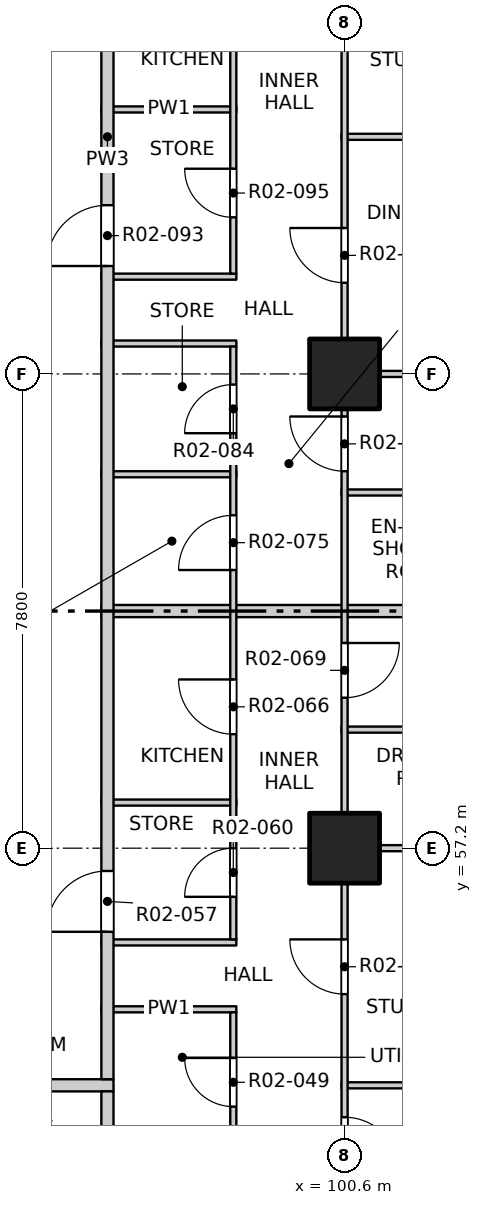
"""IFC4 building model, lengths in metres.
Left out: names, types, materials, properties, quantities, classifications, styles, units other than length and angle.
Written with IfcOpenShell. Run it as: python <this file> out.ifc"""

import sys

from ifc_helpers import new_model, si_unit, direction, frame, frame_2d, origin, origin_2d, place, context, subcontext, project, spatial, rectangle, extrude, element, fill, save


model = new_model("IFC4")
c1 = context("Model", 3, precision=1e-05, world=origin(), true_north=direction((0.0, 1.0)))
c2 = subcontext(c1, "Body", "Model", "MODEL_VIEW")
j1 = project(units=[si_unit("LENGTHUNIT", "METRE"), si_unit("PLANEANGLEUNIT", "RADIAN")], contexts=[c1])
p1 = place(None, origin())
s1 = spatial("IfcSite", under=j1, at=p1, CompositionType="ELEMENT")
p2 = place(p1, origin())
s2 = spatial("IfcBuilding", under=s1, at=p2, CompositionType="ELEMENT")
p3 = place(p2, frame((0.0, 0.0, 29.7)))
s3 = spatial("IfcBuildingStorey", under=s2, at=p3, CompositionType="ELEMENT", Elevation=29.7)
for number, where, z_axis, x_axis in (
    (1, (100.6, 57.2, -0.25), (0.0, 0.0, 1.0), (1.0, 0.0, 0.0)),
    (2, (100.6, 65.0, -0.25), (0.0, 0.0, 1.0), (1.0, 0.0, 0.0)),
):
    element("IfcColumn", number, at=place(p3, frame(where, z_axis=z_axis, x_axis=x_axis)), inside=s3, PredefinedType="COLUMN", context=c2, shape_type="SweptSolid", body=[
        extrude(rectangle(XDim=1.15, YDim=1.15, at=origin_2d()), origin(), (0.0, 0.0, 1.0), 3.4),
    ])
p4 = place(p3, frame((73.2, 53.3, 0.0), z_axis=(0.0, 0.0, 1.0), x_axis=(1.0, 0.0, 0.0)))
e3 = element("IfcWall", 3, at=p4, inside=s3, PredefinedType="PARTITIONING", context=c2, shape_type="SweptSolid", body=[
    extrude(rectangle(XDim=23.6, YDim=0.2, at=frame_2d((11.8, 0.0))), origin(), (0.0, 0.0, 1.0), 3.15),
])
p5 = place(p4, frame((5.925, 0.0, 0.0)))
e4 = element("IfcOpeningElement", 4, at=p5, cuts=e3, PredefinedType="OPENING", context=c2, shape_type="SweptSolid", body=[
    extrude(rectangle(XDim=1.0, YDim=2.1, at=frame_2d((0.5, 1.05))), frame((0.0, 0.11, 0.0), z_axis=(0.0, -1.0, 0.0), x_axis=(1.0, 0.0, 0.0)), (0.0, 0.0, 1.0), 0.22),
])
p6 = place(p4, frame((17.925, 0.0, 0.0)))
e5 = element("IfcOpeningElement", 5, at=p6, cuts=e3, PredefinedType="OPENING", context=c2, shape_type="SweptSolid", body=[
    extrude(rectangle(XDim=1.0, YDim=2.1, at=frame_2d((0.5, 1.05))), frame((0.0, 0.11, 0.0), z_axis=(0.0, -1.0, 0.0), x_axis=(1.0, 0.0, 0.0)), (0.0, 0.0, 1.0), 0.22),
])
p7 = place(p3, frame((100.55, 53.3, 0.0), z_axis=(0.0, 0.0, 1.0), x_axis=(1.0, 0.0, 0.0)))
e6 = element("IfcWall", 6, at=p7, inside=s3, PredefinedType="PARTITIONING", context=c2, shape_type="SweptSolid", body=[
    extrude(rectangle(XDim=7.55, YDim=0.1, at=frame_2d((3.775, 0.0))), origin(), (0.0, 0.0, 1.0), 3.15),
])
for number, where, z_axis, x_axis in (
    (7, (96.6, 54.55, 0.0), (0.0, 0.0, 1.0), (1.0, 0.0, 0.0)),
    (8, (96.6, 55.65, 0.0), (0.0, 0.0, 1.0), (1.0, 0.0, 0.0)),
):
    element("IfcWall", number, at=place(p3, frame(where, z_axis=z_axis, x_axis=x_axis)), inside=s3, PredefinedType="PARTITIONING", context=c2, shape_type="SweptSolid", body=[
        extrude(rectangle(XDim=2.22, YDim=0.1, at=frame_2d((1.11, 0.0))), origin(), (0.0, 0.0, 1.0), 3.15),
    ])
p8 = place(p3, frame((100.55, 57.2, 0.0), z_axis=(0.0, 0.0, 1.0), x_axis=(1.0, 0.0, 0.0)))
e9 = element("IfcWall", 9, at=p8, inside=s3, PredefinedType="PARTITIONING", context=c2, shape_type="SweptSolid", body=[
    extrude(rectangle(XDim=7.55, YDim=0.1, at=frame_2d((3.775, 0.0))), origin(), (0.0, 0.0, 1.0), 2.55),
])
p9 = place(p3, frame((96.6, 57.95, 0.0), z_axis=(0.0, 0.0, 1.0), x_axis=(1.0, 0.0, 0.0)))
e10 = element("IfcWall", 10, at=p9, inside=s3, PredefinedType="PARTITIONING", context=c2, shape_type="SweptSolid", body=[
    extrude(rectangle(XDim=2.22, YDim=0.1, at=frame_2d((1.11, 0.0))), origin(), (0.0, 0.0, 1.0), 3.15),
])
p10 = place(p3, frame((100.55, 59.15, 0.0), z_axis=(0.0, 0.0, 1.0), x_axis=(1.0, 0.0, 0.0)))
e11 = element("IfcWall", 11, at=p10, inside=s3, PredefinedType="PARTITIONING", context=c2, shape_type="SweptSolid", body=[
    extrude(rectangle(XDim=3.55, YDim=0.1, at=frame_2d((1.775, 0.0))), origin(), (0.0, 0.0, 1.0), 3.15),
])
p11 = place(p3, frame((96.6, 61.1, 0.0), z_axis=(0.0, 0.0, 1.0), x_axis=(1.0, 0.0, 0.0)))
e12 = element("IfcWall", 12, at=p11, inside=s3, PredefinedType="PARTITIONING", context=c2, shape_type="SweptSolid", body=[
    extrude(rectangle(XDim=11.5, YDim=0.2, at=frame_2d((5.75, 0.0))), origin(), (0.0, 0.0, 1.0), 3.15),
])
p12 = place(p3, frame((100.55, 63.05, 0.0), z_axis=(0.0, 0.0, 1.0), x_axis=(1.0, 0.0, 0.0)))
e13 = element("IfcWall", 13, at=p12, inside=s3, PredefinedType="PARTITIONING", context=c2, shape_type="SweptSolid", body=[
    extrude(rectangle(XDim=3.7, YDim=0.1, at=frame_2d((1.85, 0.0))), origin(), (0.0, 0.0, 1.0), 3.15),
])
p13 = place(p3, frame((96.6, 63.35, 0.0), z_axis=(0.0, 0.0, 1.0), x_axis=(1.0, 0.0, 0.0)))
e14 = element("IfcWall", 14, at=p13, inside=s3, PredefinedType="PARTITIONING", context=c2, shape_type="SweptSolid", body=[
    extrude(rectangle(XDim=2.22, YDim=0.1, at=frame_2d((1.11, 0.0))), origin(), (0.0, 0.0, 1.0), 3.15),
])
p14 = place(p3, frame((100.55, 65.0, 0.0), z_axis=(0.0, 0.0, 1.0), x_axis=(1.0, 0.0, 0.0)))
e15 = element("IfcWall", 15, at=p14, inside=s3, PredefinedType="PARTITIONING", context=c2, shape_type="SweptSolid", body=[
    extrude(rectangle(XDim=7.55, YDim=0.1, at=frame_2d((3.775, 0.0))), origin(), (0.0, 0.0, 1.0), 2.55),
])
for number, where, z_axis, x_axis in (
    (16, (96.6, 65.5, 0.0), (0.0, 0.0, 1.0), (1.0, 0.0, 0.0)),
    (17, (96.6, 66.6, 0.0), (0.0, 0.0, 1.0), (1.0, 0.0, 0.0)),
):
    element("IfcWall", number, at=place(p3, frame(where, z_axis=z_axis, x_axis=x_axis)), inside=s3, PredefinedType="PARTITIONING", context=c2, shape_type="SweptSolid", body=[
        extrude(rectangle(XDim=2.22, YDim=0.1, at=frame_2d((1.11, 0.0))), origin(), (0.0, 0.0, 1.0), 3.15),
    ])
p15 = place(p3, frame((100.55, 68.9, 0.0), z_axis=(0.0, 0.0, 1.0), x_axis=(1.0, 0.0, 0.0)))
e18 = element("IfcWall", 18, at=p15, inside=s3, PredefinedType="PARTITIONING", context=c2, shape_type="SweptSolid", body=[
    extrude(rectangle(XDim=7.55, YDim=0.1, at=frame_2d((3.775, 0.0))), origin(), (0.0, 0.0, 1.0), 3.15),
])
p16 = place(p3, frame((96.6, 69.35, 0.0), z_axis=(0.0, 0.0, 1.0), x_axis=(1.0, 0.0, 0.0)))
e19 = element("IfcWall", 19, at=p16, inside=s3, PredefinedType="PARTITIONING", context=c2, shape_type="SweptSolid", body=[
    extrude(rectangle(XDim=2.22, YDim=0.1, at=frame_2d((1.11, 0.0))), origin(), (0.0, 0.0, 1.0), 3.15),
])
p17 = place(p3, frame((96.7, 41.9, 0.0), z_axis=(0.0, 0.0, 1.0), x_axis=(0.0, 1.0, 0.0)))
e20 = element("IfcWall", 20, at=p17, inside=s3, PredefinedType="PARTITIONING", context=c2, shape_type="SweptSolid", body=[
    extrude(rectangle(XDim=11.3, YDim=0.2, at=frame_2d((5.65, 0.0))), origin(), (0.0, 0.0, 1.0), 3.15),
])
p18 = place(p3, frame((96.7, 53.4, 0.0), z_axis=(0.0, 0.0, 1.0), x_axis=(0.0, 1.0, 0.0)))
e21 = element("IfcWall", 21, at=p18, inside=s3, PredefinedType="PARTITIONING", context=c2, shape_type="SweptSolid", body=[
    extrude(rectangle(XDim=31.0, YDim=0.2, at=frame_2d((15.5, 0.0))), origin(), (0.0, 0.0, 1.0), 3.15),
])
p19 = place(p18, frame((2.425, 0.0, 0.0)))
e22 = element("IfcOpeningElement", 22, at=p19, cuts=e21, PredefinedType="OPENING", context=c2, shape_type="SweptSolid", body=[
    extrude(rectangle(XDim=1.0, YDim=2.1, at=frame_2d((0.5, 1.05))), frame((0.0, 0.11, 0.0), z_axis=(0.0, -1.0, 0.0), x_axis=(1.0, 0.0, 0.0)), (0.0, 0.0, 1.0), 0.22),
])
p20 = place(p18, frame((13.375, 0.0, 0.0)))
e23 = element("IfcOpeningElement", 23, at=p20, cuts=e21, PredefinedType="OPENING", context=c2, shape_type="SweptSolid", body=[
    extrude(rectangle(XDim=1.0, YDim=2.1, at=frame_2d((0.5, 1.05))), frame((0.0, 0.11, 0.0), z_axis=(0.0, -1.0, 0.0), x_axis=(1.0, 0.0, 0.0)), (0.0, 0.0, 1.0), 0.22),
])
p21 = place(p18, frame((29.525, 0.0, 0.0)))
e24 = element("IfcOpeningElement", 24, at=p21, cuts=e21, PredefinedType="OPENING", context=c2, shape_type="SweptSolid", body=[
    extrude(rectangle(XDim=1.0, YDim=2.1, at=frame_2d((0.5, 1.05))), frame((0.0, 0.11, 0.0), z_axis=(0.0, -1.0, 0.0), x_axis=(1.0, 0.0, 0.0)), (0.0, 0.0, 1.0), 0.22),
])
p22 = place(p3, frame((98.77, 45.55, 0.0), z_axis=(0.0, 0.0, 1.0), x_axis=(0.0, 1.0, 0.0)))
e25 = element("IfcWall", 25, at=p22, inside=s3, PredefinedType="PARTITIONING", context=c2, shape_type="SweptSolid", body=[
    extrude(rectangle(XDim=8.95, YDim=0.1, at=frame_2d((4.475, 0.0))), origin(), (0.0, 0.0, 1.0), 3.15),
])
p23 = place(p22, frame((0.4, 0.0, 0.0)))
e26 = element("IfcOpeningElement", 26, at=p23, cuts=e25, PredefinedType="OPENING", context=c2, shape_type="SweptSolid", body=[
    extrude(rectangle(XDim=0.9, YDim=2.1, at=frame_2d((0.45, 1.05))), frame((0.0, 0.06, 0.0), z_axis=(0.0, -1.0, 0.0), x_axis=(1.0, 0.0, 0.0)), (0.0, 0.0, 1.0), 0.12),
])
p24 = place(p22, frame((2.5, 0.0, 0.0)))
e27 = element("IfcOpeningElement", 27, at=p24, cuts=e25, PredefinedType="OPENING", context=c2, shape_type="SweptSolid", body=[
    extrude(rectangle(XDim=0.9, YDim=2.1, at=frame_2d((0.45, 1.05))), frame((0.0, 0.06, 0.0), z_axis=(0.0, -1.0, 0.0), x_axis=(1.0, 0.0, 0.0)), (0.0, 0.0, 1.0), 0.12),
])
p25 = place(p22, frame((4.975, 0.0, 0.0)))
e28 = element("IfcOpeningElement", 28, at=p25, cuts=e25, PredefinedType="OPENING", context=c2, shape_type="SweptSolid", body=[
    extrude(rectangle(XDim=0.8, YDim=2.1, at=frame_2d((0.4, 1.05))), frame((0.0, 0.06, 0.0), z_axis=(0.0, -1.0, 0.0), x_axis=(1.0, 0.0, 0.0)), (0.0, 0.0, 1.0), 0.12),
])
p26 = place(p22, frame((7.4, 0.0, 0.0)))
e29 = element("IfcOpeningElement", 29, at=p26, cuts=e25, PredefinedType="OPENING", context=c2, shape_type="SweptSolid", body=[
    extrude(rectangle(XDim=0.8, YDim=2.1, at=frame_2d((0.4, 1.05))), frame((0.0, 0.06, 0.0), z_axis=(0.0, -1.0, 0.0), x_axis=(1.0, 0.0, 0.0)), (0.0, 0.0, 1.0), 0.12),
])
p27 = place(p3, frame((98.77, 55.7, 0.0), z_axis=(0.0, 0.0, 1.0), x_axis=(0.0, 1.0, 0.0)))
e30 = element("IfcWall", 30, at=p27, inside=s3, PredefinedType="PARTITIONING", context=c2, shape_type="SweptSolid", body=[
    extrude(rectangle(XDim=9.75, YDim=0.1, at=frame_2d((4.875, 0.0))), origin(), (0.0, 0.0, 1.0), 3.15),
])
p28 = place(p27, frame((0.7, 0.0, 0.0)))
e31 = element("IfcOpeningElement", 31, at=p28, cuts=e30, PredefinedType="OPENING", context=c2, shape_type="SweptSolid", body=[
    extrude(rectangle(XDim=0.8, YDim=2.1, at=frame_2d((0.4, 1.05))), frame((0.0, 0.06, 0.0), z_axis=(0.0, -1.0, 0.0), x_axis=(1.0, 0.0, 0.0)), (0.0, 0.0, 1.0), 0.12),
])
p29 = place(p27, frame((3.375, 0.0, 0.0)))
e32 = element("IfcOpeningElement", 32, at=p29, cuts=e30, PredefinedType="OPENING", context=c2, shape_type="SweptSolid", body=[
    extrude(rectangle(XDim=0.9, YDim=2.1, at=frame_2d((0.45, 1.05))), frame((0.0, 0.06, 0.0), z_axis=(0.0, -1.0, 0.0), x_axis=(1.0, 0.0, 0.0)), (0.0, 0.0, 1.0), 0.12),
])
p30 = place(p27, frame((6.075, 0.0, 0.0)))
e33 = element("IfcOpeningElement", 33, at=p30, cuts=e30, PredefinedType="OPENING", context=c2, shape_type="SweptSolid", body=[
    extrude(rectangle(XDim=0.9, YDim=2.1, at=frame_2d((0.45, 1.05))), frame((0.0, 0.06, 0.0), z_axis=(0.0, -1.0, 0.0), x_axis=(1.0, 0.0, 0.0)), (0.0, 0.0, 1.0), 0.12),
])
p31 = place(p27, frame((8.325, 0.0, 0.0)))
e34 = element("IfcOpeningElement", 34, at=p31, cuts=e30, PredefinedType="OPENING", context=c2, shape_type="SweptSolid", body=[
    extrude(rectangle(XDim=0.8, YDim=2.1, at=frame_2d((0.4, 1.05))), frame((0.0, 0.06, 0.0), z_axis=(0.0, -1.0, 0.0), x_axis=(1.0, 0.0, 0.0)), (0.0, 0.0, 1.0), 0.12),
])
p32 = place(p3, frame((98.77, 66.65, 0.0), z_axis=(0.0, 0.0, 1.0), x_axis=(0.0, 1.0, 0.0)))
e35 = element("IfcWall", 35, at=p32, inside=s3, PredefinedType="PARTITIONING", context=c2, shape_type="SweptSolid", body=[
    extrude(rectangle(XDim=14.95, YDim=0.1, at=frame_2d((7.475, 0.0))), origin(), (0.0, 0.0, 1.0), 3.15),
])
p33 = place(p32, frame((0.925, 0.0, 0.0)))
e36 = element("IfcOpeningElement", 36, at=p33, cuts=e35, PredefinedType="OPENING", context=c2, shape_type="SweptSolid", body=[
    extrude(rectangle(XDim=0.8, YDim=2.1, at=frame_2d((0.4, 1.05))), frame((0.0, 0.06, 0.0), z_axis=(0.0, -1.0, 0.0), x_axis=(1.0, 0.0, 0.0)), (0.0, 0.0, 1.0), 0.12),
])
p34 = place(p32, frame((3.975, 0.0, 0.0)))
e37 = element("IfcOpeningElement", 37, at=p34, cuts=e35, PredefinedType="OPENING", context=c2, shape_type="SweptSolid", body=[
    extrude(rectangle(XDim=0.9, YDim=2.1, at=frame_2d((0.45, 1.05))), frame((0.0, 0.06, 0.0), z_axis=(0.0, -1.0, 0.0), x_axis=(1.0, 0.0, 0.0)), (0.0, 0.0, 1.0), 0.12),
])
p35 = place(p32, frame((6.915, 0.0, 0.0)))
e38 = element("IfcOpeningElement", 38, at=p35, cuts=e35, PredefinedType="OPENING", context=c2, shape_type="SweptSolid", body=[
    extrude(rectangle(XDim=0.9, YDim=2.1, at=frame_2d((0.45, 1.05))), frame((0.0, 0.06, 0.0), z_axis=(0.0, -1.0, 0.0), x_axis=(1.0, 0.0, 0.0)), (0.0, 0.0, 1.0), 0.12),
])
p36 = place(p32, frame((9.63, 0.0, 0.0)))
e39 = element("IfcOpeningElement", 39, at=p36, cuts=e35, PredefinedType="OPENING", context=c2, shape_type="SweptSolid", body=[
    extrude(rectangle(XDim=0.8, YDim=2.1, at=frame_2d((0.4, 1.05))), frame((0.0, 0.06, 0.0), z_axis=(0.0, -1.0, 0.0), x_axis=(1.0, 0.0, 0.0)), (0.0, 0.0, 1.0), 0.12),
])
p37 = place(p32, frame((12.79, 0.0, 0.0)))
e40 = element("IfcOpeningElement", 40, at=p37, cuts=e35, PredefinedType="OPENING", context=c2, shape_type="SweptSolid", body=[
    extrude(rectangle(XDim=0.9, YDim=2.1, at=frame_2d((0.45, 1.05))), frame((0.0, 0.06, 0.0), z_axis=(0.0, -1.0, 0.0), x_axis=(1.0, 0.0, 0.0)), (0.0, 0.0, 1.0), 0.12),
])
p38 = place(p3, frame((100.6, 49.4, 0.0), z_axis=(0.0, 0.0, 1.0), x_axis=(0.0, 1.0, 0.0)))
e41 = element("IfcWall", 41, at=p38, inside=s3, PredefinedType="PARTITIONING", context=c2, shape_type="SweptSolid", body=[
    extrude(rectangle(XDim=31.2, YDim=0.1, at=frame_2d((15.6, 0.0))), origin(), (0.0, 0.0, 1.0), 3.15),
])
p39 = place(p38, frame((2.475, 0.0, 0.0)))
e42 = element("IfcOpeningElement", 42, at=p39, cuts=e41, PredefinedType="OPENING", context=c2, shape_type="SweptSolid", body=[
    extrude(rectangle(XDim=0.9, YDim=2.1, at=frame_2d((0.45, 1.05))), frame((0.0, 0.06, 0.0), z_axis=(0.0, -1.0, 0.0), x_axis=(1.0, 0.0, 0.0)), (0.0, 0.0, 1.0), 0.12),
])
p40 = place(p38, frame((5.4, 0.0, 0.0)))
e43 = element("IfcOpeningElement", 43, at=p40, cuts=e41, PredefinedType="OPENING", context=c2, shape_type="SweptSolid", body=[
    extrude(rectangle(XDim=0.9, YDim=2.1, at=frame_2d((0.45, 1.05))), frame((0.0, 0.06, 0.0), z_axis=(0.0, -1.0, 0.0), x_axis=(1.0, 0.0, 0.0)), (0.0, 0.0, 1.0), 0.12),
])
p41 = place(p38, frame((10.275, 0.0, 0.0)))
e44 = element("IfcOpeningElement", 44, at=p41, cuts=e41, PredefinedType="OPENING", context=c2, shape_type="SweptSolid", body=[
    extrude(rectangle(XDim=0.9, YDim=2.1, at=frame_2d((0.45, 1.05))), frame((0.0, 0.06, 0.0), z_axis=(0.0, -1.0, 0.0), x_axis=(1.0, 0.0, 0.0)), (0.0, 0.0, 1.0), 0.12),
])
p42 = place(p38, frame((14.0, 0.0, 0.0)))
e45 = element("IfcOpeningElement", 45, at=p42, cuts=e41, PredefinedType="OPENING", context=c2, shape_type="SweptSolid", body=[
    extrude(rectangle(XDim=0.9, YDim=2.1, at=frame_2d((0.45, 1.05))), frame((0.0, 0.06, 0.0), z_axis=(0.0, -1.0, 0.0), x_axis=(1.0, 0.0, 0.0)), (0.0, 0.0, 1.0), 0.12),
])
p43 = place(p38, frame((17.1, 0.0, 0.0)))
e46 = element("IfcOpeningElement", 46, at=p43, cuts=e41, PredefinedType="OPENING", context=c2, shape_type="SweptSolid", body=[
    extrude(rectangle(XDim=0.9, YDim=2.1, at=frame_2d((0.45, 1.05))), frame((0.0, 0.06, 0.0), z_axis=(0.0, -1.0, 0.0), x_axis=(1.0, 0.0, 0.0)), (0.0, 0.0, 1.0), 0.12),
])
p44 = place(p38, frame((21.0, 0.0, 0.0)))
e47 = element("IfcOpeningElement", 47, at=p44, cuts=e41, PredefinedType="OPENING", context=c2, shape_type="SweptSolid", body=[
    extrude(rectangle(XDim=0.9, YDim=2.1, at=frame_2d((0.45, 1.05))), frame((0.0, 0.06, 0.0), z_axis=(0.0, -1.0, 0.0), x_axis=(1.0, 0.0, 0.0)), (0.0, 0.0, 1.0), 0.12),
])
p45 = place(p38, frame((25.875, 0.0, 0.0)))
e48 = element("IfcOpeningElement", 48, at=p45, cuts=e41, PredefinedType="OPENING", context=c2, shape_type="SweptSolid", body=[
    extrude(rectangle(XDim=0.9, YDim=2.1, at=frame_2d((0.45, 1.05))), frame((0.0, 0.06, 0.0), z_axis=(0.0, -1.0, 0.0), x_axis=(1.0, 0.0, 0.0)), (0.0, 0.0, 1.0), 0.12),
])
p46 = place(p38, frame((29.6, 0.0, 0.0)))
e49 = element("IfcOpeningElement", 49, at=p46, cuts=e41, PredefinedType="OPENING", context=c2, shape_type="SweptSolid", body=[
    extrude(rectangle(XDim=0.9, YDim=2.1, at=frame_2d((0.45, 1.05))), frame((0.0, 0.06, 0.0), z_axis=(0.0, -1.0, 0.0), x_axis=(1.0, 0.0, 0.0)), (0.0, 0.0, 1.0), 0.12),
])
p47 = place(p39, origin())
e50 = element("IfcDoor", 50, at=p47, inside=s3, OperationType="SINGLE_SWING_RIGHT", PredefinedType="DOOR", context=c2, shape_type="SweptSolid", body=[
    extrude(rectangle(XDim=0.9, YDim=2.1, at=frame_2d((0.45, 1.05))), frame((0.0, 0.025, 0.0), z_axis=(0.0, -1.0, 0.0), x_axis=(1.0, 0.0, 0.0)), (0.0, 0.0, 1.0), 0.05),
])
fill(e42, e50)
p48 = place(p26, origin())
e51 = element("IfcDoor", 51, at=p48, inside=s3, OperationType="SINGLE_SWING_RIGHT", PredefinedType="DOOR", context=c2, shape_type="SweptSolid", body=[
    extrude(rectangle(XDim=0.8, YDim=2.1, at=frame_2d((0.4, 1.05))), frame((0.0, 0.025, 0.0), z_axis=(0.0, -1.0, 0.0), x_axis=(1.0, 0.0, 0.0)), (0.0, 0.0, 1.0), 0.05),
])
fill(e29, e51)
p49 = place(p40, origin())
e52 = element("IfcDoor", 52, at=p49, inside=s3, OperationType="SINGLE_SWING_RIGHT", PredefinedType="DOOR", context=c2, shape_type="SweptSolid", body=[
    extrude(rectangle(XDim=0.9, YDim=2.1, at=frame_2d((0.45, 1.05))), frame((0.0, 0.025, 0.0), z_axis=(0.0, -1.0, 0.0), x_axis=(1.0, 0.0, 0.0)), (0.0, 0.0, 1.0), 0.05),
])
fill(e43, e52)
p50 = place(p19, origin())
e53 = element("IfcDoor", 53, at=p50, inside=s3, OperationType="SINGLE_SWING_LEFT", PredefinedType="DOOR", context=c2, shape_type="SweptSolid", body=[
    extrude(rectangle(XDim=1.0, YDim=2.1, at=frame_2d((0.5, 1.05))), frame((0.0, 0.025, 0.0), z_axis=(0.0, -1.0, 0.0), x_axis=(1.0, 0.0, 0.0)), (0.0, 0.0, 1.0), 0.05),
])
fill(e22, e53)
p51 = place(p28, origin())
e54 = element("IfcDoor", 54, at=p51, inside=s3, OperationType="SINGLE_SWING_LEFT", PredefinedType="DOOR", context=c2, shape_type="SweptSolid", body=[
    extrude(rectangle(XDim=0.8, YDim=2.1, at=frame_2d((0.4, 1.05))), frame((0.0, 0.025, 0.0), z_axis=(0.0, -1.0, 0.0), x_axis=(1.0, 0.0, 0.0)), (0.0, 0.0, 1.0), 0.05),
])
fill(e31, e54)
p52 = place(p29, origin())
e55 = element("IfcDoor", 55, at=p52, inside=s3, OperationType="SINGLE_SWING_RIGHT", PredefinedType="DOOR", context=c2, shape_type="SweptSolid", body=[
    extrude(rectangle(XDim=0.9, YDim=2.1, at=frame_2d((0.45, 1.05))), frame((0.0, 0.025, 0.0), z_axis=(0.0, -1.0, 0.0), x_axis=(1.0, 0.0, 0.0)), (0.0, 0.0, 1.0), 0.05),
])
fill(e32, e55)
p53 = place(p41, origin())
e56 = element("IfcDoor", 56, at=p53, inside=s3, OperationType="SINGLE_SWING_LEFT", PredefinedType="DOOR", context=c2, shape_type="SweptSolid", body=[
    extrude(rectangle(XDim=0.9, YDim=2.1, at=frame_2d((0.45, 1.05))), frame((0.0, 0.025, 0.0), z_axis=(0.0, -1.0, 0.0), x_axis=(1.0, 0.0, 0.0)), (0.0, 0.0, 1.0), 0.05),
])
fill(e44, e56)
p54 = place(p30, origin())
e57 = element("IfcDoor", 57, at=p54, inside=s3, OperationType="SINGLE_SWING_LEFT", PredefinedType="DOOR", context=c2, shape_type="SweptSolid", body=[
    extrude(rectangle(XDim=0.9, YDim=2.1, at=frame_2d((0.45, 1.05))), frame((0.0, 0.025, 0.0), z_axis=(0.0, -1.0, 0.0), x_axis=(1.0, 0.0, 0.0)), (0.0, 0.0, 1.0), 0.05),
])
fill(e33, e57)
p55 = place(p42, origin())
e58 = element("IfcDoor", 58, at=p55, inside=s3, OperationType="SINGLE_SWING_RIGHT", PredefinedType="DOOR", context=c2, shape_type="SweptSolid", body=[
    extrude(rectangle(XDim=0.9, YDim=2.1, at=frame_2d((0.45, 1.05))), frame((0.0, 0.025, 0.0), z_axis=(0.0, -1.0, 0.0), x_axis=(1.0, 0.0, 0.0)), (0.0, 0.0, 1.0), 0.05),
])
fill(e45, e58)
p56 = place(p31, origin())
e59 = element("IfcDoor", 59, at=p56, inside=s3, OperationType="SINGLE_SWING_LEFT", PredefinedType="DOOR", context=c2, shape_type="SweptSolid", body=[
    extrude(rectangle(XDim=0.8, YDim=2.1, at=frame_2d((0.4, 1.05))), frame((0.0, 0.025, 0.0), z_axis=(0.0, -1.0, 0.0), x_axis=(1.0, 0.0, 0.0)), (0.0, 0.0, 1.0), 0.05),
])
fill(e34, e59)
p57 = place(p43, origin())
e60 = element("IfcDoor", 60, at=p57, inside=s3, OperationType="SINGLE_SWING_RIGHT", PredefinedType="DOOR", context=c2, shape_type="SweptSolid", body=[
    extrude(rectangle(XDim=0.9, YDim=2.1, at=frame_2d((0.45, 1.05))), frame((0.0, 0.025, 0.0), z_axis=(0.0, -1.0, 0.0), x_axis=(1.0, 0.0, 0.0)), (0.0, 0.0, 1.0), 0.05),
])
fill(e46, e60)
p58 = place(p20, origin())
e61 = element("IfcDoor", 61, at=p58, inside=s3, OperationType="SINGLE_SWING_LEFT", PredefinedType="DOOR", context=c2, shape_type="SweptSolid", body=[
    extrude(rectangle(XDim=1.0, YDim=2.1, at=frame_2d((0.5, 1.05))), frame((0.0, 0.025, 0.0), z_axis=(0.0, -1.0, 0.0), x_axis=(1.0, 0.0, 0.0)), (0.0, 0.0, 1.0), 0.05),
])
fill(e23, e61)
p59 = place(p33, origin())
e62 = element("IfcDoor", 62, at=p59, inside=s3, OperationType="SINGLE_SWING_RIGHT", PredefinedType="DOOR", context=c2, shape_type="SweptSolid", body=[
    extrude(rectangle(XDim=0.8, YDim=2.1, at=frame_2d((0.4, 1.05))), frame((0.0, 0.025, 0.0), z_axis=(0.0, -1.0, 0.0), x_axis=(1.0, 0.0, 0.0)), (0.0, 0.0, 1.0), 0.05),
])
fill(e36, e62)
save(model, sys.argv[1])
